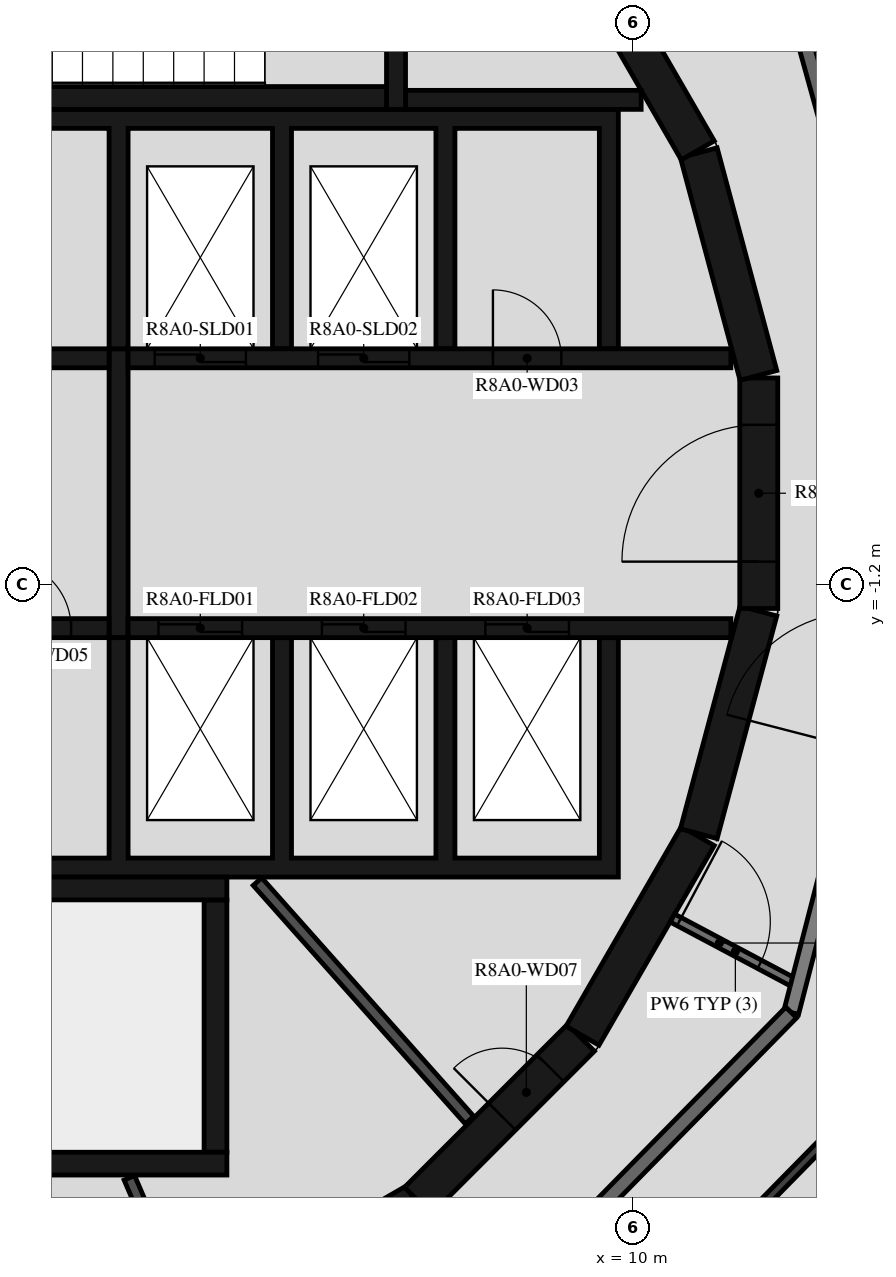
"""IFC4 building model, lengths in metres.
Left out: names, types, materials, properties, quantities, classifications, styles, units other than length and angle.
Written with IfcOpenShell. Run it as: python <this file> out.ifc"""

import sys

from ifc_helpers import new_model, si_unit, direction, frame, frame_2d, origin, place, context, subcontext, project, spatial, polyline, rectangle, outline, extrude, element, fill, save


model = new_model("IFC4")
c1 = context("Model", 3, precision=1e-05, world=origin(), true_north=direction((0.0, 1.0)))
c2 = subcontext(c1, "Body", "Model", "MODEL_VIEW")
j1 = project(units=[si_unit("LENGTHUNIT", "METRE"), si_unit("PLANEANGLEUNIT", "RADIAN")], contexts=[c1])
p1 = place(None, origin())
s1 = spatial("IfcSite", under=j1, at=p1, CompositionType="ELEMENT")
p2 = place(p1, origin())
s2 = spatial("IfcBuilding", under=s1, at=p2, CompositionType="ELEMENT")
p3 = place(p2, frame((0.0, 0.0, 298.2)))
s3 = spatial("IfcBuildingStorey", under=s2, at=p3, CompositionType="ELEMENT", Elevation=298.2)
p4 = place(p3, frame((4.51, -10.845, 0.0), z_axis=(0.0, 0.0, 1.0), x_axis=(0.865975092491, 0.500087131594, 0.0)))
e1 = element("IfcWall", 1, at=p4, inside=s3, PredefinedType="SHEAR", context=c2, shape_type="SweptSolid", body=[
    extrude(rectangle(XDim=3.033, YDim=0.5, at=frame_2d((1.516, 0.0))), origin(), (0.0, 0.0, 1.0), 3.12),
])
p5 = place(p4, frame((1.066, 0.0, 0.0)))
e2 = element("IfcOpeningElement", 2, at=p5, cuts=e1, PredefinedType="OPENING", context=c2, shape_type="SweptSolid", body=[
    extrude(rectangle(XDim=0.9, YDim=2.1, at=frame_2d((0.45, 1.05))), frame((0.0, 0.26, 0.0), z_axis=(0.0, -1.0, 0.0), x_axis=(1.0, 0.0, 0.0)), (0.0, 0.0, 1.0), 0.52),
])
p6 = place(p3, frame((7.164, -9.308, 0.0), z_axis=(0.0, 0.0, 1.0), x_axis=(0.707106781187, 0.707106781187, 0.0)))
e3 = element("IfcWall", 3, at=p6, inside=s3, PredefinedType="SHEAR", context=c2, shape_type="SweptSolid", body=[
    extrude(rectangle(XDim=3.032, YDim=0.5, at=frame_2d((1.516, 0.0))), origin(), (0.0, 0.0, 1.0), 3.12),
])
p7 = place(p6, frame((1.566, 0.0, 0.0)))
e4 = element("IfcOpeningElement", 4, at=p7, cuts=e3, PredefinedType="OPENING", context=c2, shape_type="SweptSolid", body=[
    extrude(rectangle(XDim=0.9, YDim=2.1, at=frame_2d((0.45, 1.05))), frame((0.0, 0.26, 0.0), z_axis=(0.0, -1.0, 0.0), x_axis=(1.0, 0.0, 0.0)), (0.0, 0.0, 1.0), 0.52),
])
for number, where, z_axis, x_axis in (
    (5, (9.329, -7.137, 0.0), (0.0, 0.0, 1.0), (0.5, 0.866, 0.0)),
    (6, (10.858, -4.479, 0.0), (0.0, 0.0, 1.0), (0.259, 0.966, 0.0)),
):
    element("IfcWall", number, at=place(p3, frame(where, z_axis=z_axis, x_axis=x_axis)), inside=s3, PredefinedType="SHEAR", context=c2, shape_type="SweptSolid", body=[
        extrude(rectangle(XDim=3.033, YDim=0.5, at=frame_2d((1.516, 0.0))), origin(), (0.0, 0.0, 1.0), 3.12),
    ])
p8 = place(p3, frame((11.647, -1.516, 0.0), z_axis=(0.0, 0.0, 1.0), x_axis=(0.0, 1.0, 0.0)))
e7 = element("IfcWall", 7, at=p8, inside=s3, PredefinedType="SHEAR", context=c2, shape_type="SweptSolid", body=[
    extrude(rectangle(XDim=3.033, YDim=0.5, at=frame_2d((1.516, 0.0))), origin(), (0.0, 0.0, 1.0), 3.12),
])
p9 = place(p8, frame((0.616, 0.0, 0.0)))
e8 = element("IfcOpeningElement", 8, at=p9, cuts=e7, PredefinedType="OPENING", context=c2, shape_type="SweptSolid", body=[
    extrude(rectangle(XDim=1.8, YDim=2.1, at=frame_2d((0.9, 1.05))), frame((0.0, 0.26, 0.0), z_axis=(0.0, -1.0, 0.0), x_axis=(1.0, 0.0, 0.0)), (0.0, 0.0, 1.0), 0.52),
])
for number, where, z_axis, x_axis in (
    (9, (11.643, 1.55, 0.0), (0.0, 0.0, 1.0), (-0.259, 0.966, 0.0)),
    (10, (10.845, 4.51, 0.0), (0.0, 0.0, 1.0), (-0.5, 0.866, 0.0)),
):
    element("IfcWall", number, at=place(p3, frame(where, z_axis=z_axis, x_axis=x_axis)), inside=s3, PredefinedType="SHEAR", context=c2, shape_type="SweptSolid", body=[
        extrude(rectangle(XDim=3.033, YDim=0.5, at=frame_2d((1.516, 0.0))), origin(), (0.0, 0.0, 1.0), 3.12),
    ])
p10 = place(p3, frame((0.0, 5.2, 0.0), z_axis=(0.0, 0.0, 1.0), x_axis=(1.0, 0.0, 0.0)))
e11 = element("IfcWall", 11, at=p10, inside=s3, PredefinedType="SHEAR", context=c2, shape_type="SweptSolid", body=[
    extrude(rectangle(XDim=6.75, YDim=0.3, at=frame_2d((3.375, 0.0))), origin(), (0.0, 0.0, 1.0), 3.12),
])
p11 = place(p3, frame((6.875, 5.05, 0.0), z_axis=(0.0, 0.0, 1.0), x_axis=(0.0, 1.0, 0.0)))
e12 = element("IfcWall", 12, at=p11, inside=s3, PredefinedType="SHEAR", context=c2, shape_type="SweptSolid", body=[
    extrude(rectangle(XDim=3.92, YDim=0.25, at=frame_2d((1.96, 0.0))), origin(), (0.0, 0.0, 1.0), 3.12),
])
p12 = place(p11, frame((1.11, 0.0, 0.0)))
e13 = element("IfcOpeningElement", 13, at=p12, cuts=e12, PredefinedType="OPENING", context=c2, shape_type="SweptSolid", body=[
    extrude(rectangle(XDim=1.2, YDim=2.1, at=frame_2d((0.6, 1.05))), frame((0.0, 0.135, 0.0), z_axis=(0.0, -1.0, 0.0), x_axis=(1.0, 0.0, 0.0)), (0.0, 0.0, 1.0), 0.27),
])
p13 = place(p3, frame((7.0, 5.175, 0.0), z_axis=(0.0, 0.0, 1.0), x_axis=(1.0, 0.0, 0.0)))
e14 = element("IfcWall", 14, at=p13, inside=s3, PredefinedType="SHEAR", context=c2, shape_type="SweptSolid", body=[
    extrude(rectangle(XDim=3.1, YDim=0.25, at=frame_2d((1.55, 0.0))), origin(), (0.0, 0.0, 1.0), 3.12),
])
p14 = place(p3, frame((-2.4, -5.2, 0.0), z_axis=(0.0, 0.0, 1.0), x_axis=(1.0, 0.0, 0.0)))
e15 = element("IfcWall", 15, at=p14, inside=s3, PredefinedType="SHEAR", context=c2, shape_type="SweptSolid", body=[
    extrude(rectangle(XDim=7.05, YDim=0.3, at=frame_2d((3.525, 0.0))), origin(), (0.0, 0.0, 1.0), 3.12),
])
p15 = place(p3, frame((4.5, -8.67, 0.0), z_axis=(0.0, 0.0, 1.0), x_axis=(0.0, 1.0, 0.0)))
e16 = element("IfcWall", 16, at=p15, inside=s3, PredefinedType="SHEAR", context=c2, shape_type="SweptSolid", body=[
    extrude(rectangle(XDim=3.32, YDim=0.3, at=frame_2d((1.66, 0.0))), origin(), (0.0, 0.0, 1.0), 3.12),
])
p16 = place(p3, frame((0.1, -8.82, 0.0), z_axis=(0.0, 0.0, 1.0), x_axis=(1.0, 0.0, 0.0)))
e17 = element("IfcWall", 17, at=p16, inside=s3, PredefinedType="SHEAR", context=c2, shape_type="SweptSolid", body=[
    extrude(rectangle(XDim=4.55, YDim=0.3, at=frame_2d((2.275, 0.0))), origin(), (0.0, 0.0, 1.0), 3.12),
])
p17 = place(p3, origin())
e18 = element("IfcWall", 18, at=p17, inside=s3, PredefinedType="SHEAR", context=c2, shape_type="SweptSolid", body=[
    extrude(outline(polyline([(-9.8, 1.9), (-9.55, 1.9), (-9.55, 4.8), (-1.2, 4.8), (-1.2, 1.9), (-0.95, 1.9), (-0.95, 4.8), (3.1, 4.8), (3.1, 1.9), (3.35, 1.9), (3.35, 4.8), (5.25, 4.8), (5.25, 1.9), (5.5, 1.9), (5.5, 4.8), (7.4, 4.8), (7.4, 1.9), (7.65, 1.9), (7.65, 4.8), (9.55, 4.8), (9.55, 1.9), (9.8, 1.9), (9.8, 4.8), (9.8, 5.05), (-9.8, 5.05), (-9.8, 4.8), (-9.8, 1.9)])), origin(), (0.0, 0.0, 1.0), 3.12),
])
p18 = place(p3, origin())
e19 = element("IfcWall", 19, at=p18, inside=s3, PredefinedType="SHEAR", context=c2, shape_type="SweptSolid", body=[
    extrude(outline(polyline([(9.8, -5.05), (9.8, -4.8), (9.8, -1.9), (9.55, -1.9), (9.55, -4.8), (7.65, -4.8), (7.65, -1.9), (7.4, -1.9), (7.4, -4.8), (5.5, -4.8), (5.5, -1.9), (5.25, -1.9), (5.25, -4.8), (3.35, -4.8), (3.35, -1.9), (3.1, -1.9), (3.1, -4.8), (1.2, -4.8), (1.2, -1.9), (0.95, -1.9), (0.95, -4.8), (-0.95, -4.8), (-0.95, -1.9), (-1.2, -1.9), (-1.2, -4.8), (-3.1, -4.8), (-3.1, -1.9), (-3.35, -1.9), (-3.35, -4.8), (-5.25, -4.8), (-5.25, -1.9), (-5.5, -1.9), (-5.5, -4.8), (-9.55, -4.8), (-9.55, -1.9), (-9.8, -1.9), (-9.8, -4.8), (-9.8, -5.05), (9.8, -5.05)])), origin(), (0.0, 0.0, 1.0), 3.12),
])
p19 = place(p3, frame((-11.28, 1.775, 0.0), z_axis=(0.0, 0.0, 1.0), x_axis=(1.0, 0.0, 0.0)))
e20 = element("IfcWall", 20, at=p19, inside=s3, PredefinedType="SHEAR", context=c2, shape_type="SweptSolid", body=[
    extrude(rectangle(XDim=14.38, YDim=0.25, at=frame_2d((7.19, 0.0))), origin(), (0.0, 0.0, 1.0), 3.12),
])
p20 = place(p19, frame((5.455, 0.0, 0.0)))
e21 = element("IfcOpeningElement", 21, at=p20, cuts=e20, PredefinedType="OPENING", context=c2, shape_type="SweptSolid", body=[
    extrude(rectangle(XDim=0.9, YDim=2.1, at=frame_2d((0.45, 1.05))), frame((0.0, 0.135, 0.0), z_axis=(0.0, -1.0, 0.0), x_axis=(1.0, 0.0, 0.0)), (0.0, 0.0, 1.0), 0.27),
])
p21 = place(p19, frame((11.905, 0.0, 0.0)))
e22 = element("IfcOpeningElement", 22, at=p21, cuts=e20, PredefinedType="OPENING", context=c2, shape_type="SweptSolid", body=[
    extrude(rectangle(XDim=0.9, YDim=2.1, at=frame_2d((0.45, 1.05))), frame((0.0, 0.135, 0.0), z_axis=(0.0, -1.0, 0.0), x_axis=(1.0, 0.0, 0.0)), (0.0, 0.0, 1.0), 0.27),
])
p22 = place(p3, frame((3.35, 1.775, 0.0), z_axis=(0.0, 0.0, 1.0), x_axis=(1.0, 0.0, 0.0)))
e23 = element("IfcWall", 23, at=p22, inside=s3, PredefinedType="SHEAR", context=c2, shape_type="SweptSolid", body=[
    extrude(rectangle(XDim=7.93, YDim=0.25, at=frame_2d((3.965, 0.0))), origin(), (0.0, 0.0, 1.0), 3.12),
])
p23 = place(p22, frame((0.35, 0.0, 0.0)))
e24 = element("IfcOpeningElement", 24, at=p23, cuts=e23, PredefinedType="OPENING", context=c2, shape_type="SweptSolid", body=[
    extrude(rectangle(XDim=1.2, YDim=2.4, at=frame_2d((0.6, 1.2))), frame((0.0, 0.135, 0.0), z_axis=(0.0, -1.0, 0.0), x_axis=(1.0, 0.0, 0.0)), (0.0, 0.0, 1.0), 0.27),
])
p24 = place(p22, frame((2.5, 0.0, 0.0)))
e25 = element("IfcOpeningElement", 25, at=p24, cuts=e23, PredefinedType="OPENING", context=c2, shape_type="SweptSolid", body=[
    extrude(rectangle(XDim=1.2, YDim=2.4, at=frame_2d((0.6, 1.2))), frame((0.0, 0.135, 0.0), z_axis=(0.0, -1.0, 0.0), x_axis=(1.0, 0.0, 0.0)), (0.0, 0.0, 1.0), 0.27),
])
p25 = place(p22, frame((4.8, 0.0, 0.0)))
e26 = element("IfcOpeningElement", 26, at=p25, cuts=e23, PredefinedType="OPENING", context=c2, shape_type="SweptSolid", body=[
    extrude(rectangle(XDim=0.9, YDim=2.1, at=frame_2d((0.45, 1.05))), frame((0.0, 0.135, 0.0), z_axis=(0.0, -1.0, 0.0), x_axis=(1.0, 0.0, 0.0)), (0.0, 0.0, 1.0), 0.27),
])
p26 = place(p3, frame((-11.28, -1.775, 0.0), z_axis=(0.0, 0.0, 1.0), x_axis=(1.0, 0.0, 0.0)))
e27 = element("IfcWall", 27, at=p26, inside=s3, PredefinedType="SHEAR", context=c2, shape_type="SweptSolid", body=[
    extrude(rectangle(XDim=14.38, YDim=0.25, at=frame_2d((7.19, 0.0))), origin(), (0.0, 0.0, 1.0), 3.12),
])
p27 = place(p26, frame((6.43, 0.0, 0.0)))
e28 = element("IfcOpeningElement", 28, at=p27, cuts=e27, PredefinedType="OPENING", context=c2, shape_type="SweptSolid", body=[
    extrude(rectangle(XDim=1.1, YDim=2.1, at=frame_2d((0.55, 1.05))), frame((0.0, 0.135, 0.0), z_axis=(0.0, -1.0, 0.0), x_axis=(1.0, 0.0, 0.0)), (0.0, 0.0, 1.0), 0.27),
])
p28 = place(p26, frame((8.58, 0.0, 0.0)))
e29 = element("IfcOpeningElement", 29, at=p28, cuts=e27, PredefinedType="OPENING", context=c2, shape_type="SweptSolid", body=[
    extrude(rectangle(XDim=1.1, YDim=2.1, at=frame_2d((0.55, 1.05))), frame((0.0, 0.135, 0.0), z_axis=(0.0, -1.0, 0.0), x_axis=(1.0, 0.0, 0.0)), (0.0, 0.0, 1.0), 0.27),
])
p29 = place(p26, frame((10.73, 0.0, 0.0)))
e30 = element("IfcOpeningElement", 30, at=p29, cuts=e27, PredefinedType="OPENING", context=c2, shape_type="SweptSolid", body=[
    extrude(rectangle(XDim=1.1, YDim=2.1, at=frame_2d((0.55, 1.05))), frame((0.0, 0.135, 0.0), z_axis=(0.0, -1.0, 0.0), x_axis=(1.0, 0.0, 0.0)), (0.0, 0.0, 1.0), 0.27),
])
p30 = place(p26, frame((3.305, 0.0, 0.0)))
e31 = element("IfcOpeningElement", 31, at=p30, cuts=e27, PredefinedType="OPENING", context=c2, shape_type="SweptSolid", body=[
    extrude(rectangle(XDim=0.9, YDim=2.1, at=frame_2d((0.45, 1.05))), frame((0.0, 0.135, 0.0), z_axis=(0.0, -1.0, 0.0), x_axis=(1.0, 0.0, 0.0)), (0.0, 0.0, 1.0), 0.27),
])
p31 = place(p26, frame((12.98, 0.0, 0.0)))
e32 = element("IfcOpeningElement", 32, at=p31, cuts=e27, PredefinedType="OPENING", context=c2, shape_type="SweptSolid", body=[
    extrude(rectangle(XDim=0.9, YDim=2.1, at=frame_2d((0.45, 1.05))), frame((0.0, 0.135, 0.0), z_axis=(0.0, -1.0, 0.0), x_axis=(1.0, 0.0, 0.0)), (0.0, 0.0, 1.0), 0.27),
])
p32 = place(p3, frame((3.35, -1.775, 0.0), z_axis=(0.0, 0.0, 1.0), x_axis=(1.0, 0.0, 0.0)))
e33 = element("IfcWall", 33, at=p32, inside=s3, PredefinedType="SHEAR", context=c2, shape_type="SweptSolid", body=[
    extrude(rectangle(XDim=7.93, YDim=0.25, at=frame_2d((3.965, 0.0))), origin(), (0.0, 0.0, 1.0), 3.12),
])
p33 = place(p32, frame((0.4, 0.0, 0.0)))
e34 = element("IfcOpeningElement", 34, at=p33, cuts=e33, PredefinedType="OPENING", context=c2, shape_type="SweptSolid", body=[
    extrude(rectangle(XDim=1.1, YDim=2.4, at=frame_2d((0.55, 1.2))), frame((0.0, 0.135, 0.0), z_axis=(0.0, -1.0, 0.0), x_axis=(1.0, 0.0, 0.0)), (0.0, 0.0, 1.0), 0.27),
])
p34 = place(p32, frame((2.55, 0.0, 0.0)))
e35 = element("IfcOpeningElement", 35, at=p34, cuts=e33, PredefinedType="OPENING", context=c2, shape_type="SweptSolid", body=[
    extrude(rectangle(XDim=1.1, YDim=2.4, at=frame_2d((0.55, 1.2))), frame((0.0, 0.135, 0.0), z_axis=(0.0, -1.0, 0.0), x_axis=(1.0, 0.0, 0.0)), (0.0, 0.0, 1.0), 0.27),
])
p35 = place(p32, frame((4.7, 0.0, 0.0)))
e36 = element("IfcOpeningElement", 36, at=p35, cuts=e33, PredefinedType="OPENING", context=c2, shape_type="SweptSolid", body=[
    extrude(rectangle(XDim=1.1, YDim=2.4, at=frame_2d((0.55, 1.2))), frame((0.0, 0.135, 0.0), z_axis=(0.0, -1.0, 0.0), x_axis=(1.0, 0.0, 0.0)), (0.0, 0.0, 1.0), 0.27),
])
p36 = place(p3, frame((3.225, -1.9, 0.0), z_axis=(0.0, 0.0, 1.0), x_axis=(0.0, 1.0, 0.0)))
e37 = element("IfcWall", 37, at=p36, inside=s3, PredefinedType="SHEAR", context=c2, shape_type="SweptSolid", body=[
    extrude(rectangle(XDim=3.8, YDim=0.25, at=frame_2d((1.9, 0.0))), origin(), (0.0, 0.0, 1.0), 3.12),
])
p37 = place(p3, frame((7.842, -8.248, 0.0), z_axis=(0.0, 0.0, 1.0), x_axis=(-0.66446128181, 0.747322691329, 0.0)))
e38 = element("IfcWall", 38, at=p37, inside=s3, PredefinedType="PARTITIONING", context=c2, shape_type="SweptSolid", body=[
    extrude(rectangle(XDim=4.198, YDim=0.15, at=frame_2d((2.099, 0.0))), origin(), (0.0, 0.0, 1.0), 3.12),
])
p38 = place(p3, frame((3.367, -9.007, 0.0), z_axis=(0.0, 0.0, 1.0), x_axis=(0.394387482265, -0.918944238696, 0.0)))
e39 = element("IfcWall", 39, at=p38, inside=s3, PredefinedType="PARTITIONING", context=c2, shape_type="SweptSolid", body=[
    extrude(rectangle(XDim=1.825, YDim=0.15, at=frame_2d((0.913, 0.0))), origin(), (0.0, 0.0, 1.0), 3.12),
])
p39 = place(p3, frame((10.511, -5.589, 0.0), z_axis=(0.0, 0.0, 1.0), x_axis=(0.882957311919, -0.469453283437, 0.0)))
e40 = element("IfcWall", 40, at=p39, inside=s3, PredefinedType="PARTITIONING", context=c2, shape_type="SweptSolid", body=[
    extrude(rectangle(XDim=1.876, YDim=0.12, at=frame_2d((0.938, 0.0))), origin(), (0.0, 0.0, 1.0), 3.12),
])
p40 = place(p39, frame((0.1, 0.0, 0.0)))
e41 = element("IfcOpeningElement", 41, at=p40, cuts=e40, PredefinedType="OPENING", context=c2, shape_type="SweptSolid", body=[
    extrude(rectangle(XDim=1.2, YDim=2.1, at=frame_2d((0.6, 1.05))), frame((0.0, 0.07, 0.0), z_axis=(0.0, -1.0, 0.0), x_axis=(1.0, 0.0, 0.0)), (0.0, 0.0, 1.0), 0.14),
])
p41 = place(p3, frame((12.074, -6.831, 0.0), z_axis=(0.0, 0.0, 1.0), x_axis=(0.250391063186, 0.968144780225, 0.0)))
e42 = element("IfcWall", 42, at=p41, inside=s3, PredefinedType="STANDARD", context=c2, shape_type="SweptSolid", body=[
    extrude(rectangle(XDim=7.181, YDim=0.2, at=frame_2d((3.591, 0.0))), origin(), (0.0, 0.0, 1.0), 3.12),
])
p42 = place(p41, frame((3.581, 0.0, 0.0)))
e43 = element("IfcOpeningElement", 43, at=p42, cuts=e42, PredefinedType="OPENING", context=c2, shape_type="SweptSolid", body=[
    extrude(rectangle(XDim=1.8, YDim=2.1, at=frame_2d((0.9, 1.05))), frame((0.0, 0.11, 0.0), z_axis=(0.0, -1.0, 0.0), x_axis=(1.0, 0.0, 0.0)), (0.0, 0.0, 1.0), 0.22),
])
p43 = place(p3, frame((12.913, 3.581, 0.0), z_axis=(0.0, 0.0, 1.0), x_axis=(-0.267223005422, 0.963634715737, 0.0)))
e44 = element("IfcWall", 44, at=p43, inside=s3, PredefinedType="STANDARD", context=c2, shape_type="SweptSolid", body=[
    extrude(rectangle(XDim=3.591, YDim=0.2, at=frame_2d((1.795, 0.0))), origin(), (0.0, 0.0, 1.0), 3.12),
])
p44 = place(p3, frame((7.041, -11.953, 0.0), z_axis=(0.0, 0.0, 1.0), x_axis=(0.70090916255, 0.713250549143, 0.0)))
e45 = element("IfcWall", 45, at=p44, inside=s3, PredefinedType="STANDARD", context=c2, shape_type="SweptSolid", body=[
    extrude(rectangle(XDim=7.181, YDim=0.2, at=frame_2d((3.59, 0.0))), origin(), (0.0, 0.0, 1.0), 3.12),
])
p45 = place(p44, frame((0.2, 0.0, 0.0)))
e46 = element("IfcOpeningElement", 46, at=p45, cuts=e45, PredefinedType="OPENING", context=c2, shape_type="SweptSolid", body=[
    extrude(rectangle(XDim=1.0, YDim=2.1, at=frame_2d((0.5, 1.05))), frame((0.0, 0.11, 0.0), z_axis=(0.0, -1.0, 0.0), x_axis=(1.0, 0.0, 0.0)), (0.0, 0.0, 1.0), 0.22),
])
p46 = place(p3, frame((7.846, -13.273, 0.0), z_axis=(0.0, 0.0, 1.0), x_axis=(0.700911018066, 0.713248725728, 0.0)))
e47 = element("IfcWall", 47, at=p46, inside=s3, PredefinedType="PARTITIONING", context=c2, shape_type="SweptSolid", body=[
    extrude(rectangle(XDim=7.935, YDim=0.12, at=frame_2d((3.968, 0.0))), origin(), (0.0, 0.0, 1.0), 3.12),
])
p47 = place(p46, frame((0.2, 0.0, 0.0)))
e48 = element("IfcOpeningElement", 48, at=p47, cuts=e47, PredefinedType="OPENING", context=c2, shape_type="SweptSolid", body=[
    extrude(rectangle(XDim=0.9, YDim=2.1, at=frame_2d((0.45, 1.05))), frame((0.0, 0.07, 0.0), z_axis=(0.0, -1.0, 0.0), x_axis=(1.0, 0.0, 0.0)), (0.0, 0.0, 1.0), 0.14),
])
p48 = place(p9, origin())
e49 = element("IfcDoor", 49, at=p48, inside=s3, OperationType="DOUBLE_DOOR_SINGLE_SWING", PredefinedType="DOOR", context=c2, shape_type="SweptSolid", body=[
    extrude(rectangle(XDim=1.8, YDim=2.1, at=frame_2d((0.9, 1.05))), frame((0.0, 0.025, 0.0), z_axis=(0.0, -1.0, 0.0), x_axis=(1.0, 0.0, 0.0)), (0.0, 0.0, 1.0), 0.05),
])
fill(e8, e49)
p49 = place(p23, origin())
e50 = element("IfcDoor", 50, at=p49, inside=s3, OperationType="DOUBLE_DOOR_SLIDING", PredefinedType="DOOR", context=c2, shape_type="SweptSolid", body=[
    extrude(rectangle(XDim=1.2, YDim=2.4, at=frame_2d((0.6, 1.2))), frame((0.0, 0.025, 0.0), z_axis=(0.0, -1.0, 0.0), x_axis=(1.0, 0.0, 0.0)), (0.0, 0.0, 1.0), 0.05),
])
fill(e24, e50)
p50 = place(p24, origin())
e51 = element("IfcDoor", 51, at=p50, inside=s3, OperationType="DOUBLE_DOOR_SLIDING", PredefinedType="DOOR", context=c2, shape_type="SweptSolid", body=[
    extrude(rectangle(XDim=1.2, YDim=2.4, at=frame_2d((0.6, 1.2))), frame((0.0, 0.025, 0.0), z_axis=(0.0, -1.0, 0.0), x_axis=(1.0, 0.0, 0.0)), (0.0, 0.0, 1.0), 0.05),
])
fill(e25, e51)
p51 = place(p33, origin())
e52 = element("IfcDoor", 52, at=p51, inside=s3, OperationType="DOUBLE_DOOR_SLIDING", PredefinedType="DOOR", context=c2, shape_type="SweptSolid", body=[
    extrude(rectangle(XDim=1.1, YDim=2.4, at=frame_2d((0.55, 1.2))), frame((0.0, 0.025, 0.0), z_axis=(0.0, -1.0, 0.0), x_axis=(1.0, 0.0, 0.0)), (0.0, 0.0, 1.0), 0.05),
])
fill(e34, e52)
p52 = place(p34, origin())
e53 = element("IfcDoor", 53, at=p52, inside=s3, OperationType="DOUBLE_DOOR_SLIDING", PredefinedType="DOOR", context=c2, shape_type="SweptSolid", body=[
    extrude(rectangle(XDim=1.1, YDim=2.4, at=frame_2d((0.55, 1.2))), frame((0.0, 0.025, 0.0), z_axis=(0.0, -1.0, 0.0), x_axis=(1.0, 0.0, 0.0)), (0.0, 0.0, 1.0), 0.05),
])
fill(e35, e53)
p53 = place(p35, origin())
e54 = element("IfcDoor", 54, at=p53, inside=s3, OperationType="DOUBLE_DOOR_SLIDING", PredefinedType="DOOR", context=c2, shape_type="SweptSolid", body=[
    extrude(rectangle(XDim=1.1, YDim=2.4, at=frame_2d((0.55, 1.2))), frame((0.0, 0.025, 0.0), z_axis=(0.0, -1.0, 0.0), x_axis=(1.0, 0.0, 0.0)), (0.0, 0.0, 1.0), 0.05),
])
fill(e36, e54)
p54 = place(p25, origin())
e55 = element("IfcDoor", 55, at=p54, inside=s3, OperationType="SINGLE_SWING_LEFT", PredefinedType="DOOR", context=c2, shape_type="SweptSolid", body=[
    extrude(rectangle(XDim=0.9, YDim=2.1, at=frame_2d((0.45, 1.05))), frame((0.0, 0.025, 0.0), z_axis=(0.0, -1.0, 0.0), x_axis=(1.0, 0.0, 0.0)), (0.0, 0.0, 1.0), 0.05),
])
fill(e26, e55)
p55 = place(p31, origin())
e56 = element("IfcDoor", 56, at=p55, inside=s3, OperationType="SINGLE_SWING_LEFT", PredefinedType="DOOR", context=c2, shape_type="SweptSolid", body=[
    extrude(rectangle(XDim=0.9, YDim=2.1, at=frame_2d((0.45, 1.05))), frame((0.0, 0.025, 0.0), z_axis=(0.0, -1.0, 0.0), x_axis=(1.0, 0.0, 0.0)), (0.0, 0.0, 1.0), 0.05),
])
fill(e32, e56)
p56 = place(p7, origin())
e57 = element("IfcDoor", 57, at=p56, inside=s3, OperationType="SINGLE_SWING_LEFT", PredefinedType="DOOR", context=c2, shape_type="SweptSolid", body=[
    extrude(rectangle(XDim=0.9, YDim=2.1, at=frame_2d((0.45, 1.05))), frame((0.0, 0.025, 0.0), z_axis=(0.0, -1.0, 0.0), x_axis=(1.0, 0.0, 0.0)), (0.0, 0.0, 1.0), 0.05),
])
fill(e4, e57)
p57 = place(p40, origin())
e58 = element("IfcDoor", 58, at=p57, inside=s3, OperationType="DOUBLE_DOOR_SINGLE_SWING", PredefinedType="DOOR", context=c2, shape_type="SweptSolid", body=[
    extrude(rectangle(XDim=1.2, YDim=2.1, at=frame_2d((0.6, 1.05))), frame((0.0, 0.025, 0.0), z_axis=(0.0, -1.0, 0.0), x_axis=(1.0, 0.0, 0.0)), (0.0, 0.0, 1.0), 0.05),
])
fill(e41, e58)
save(model, sys.argv[1])
